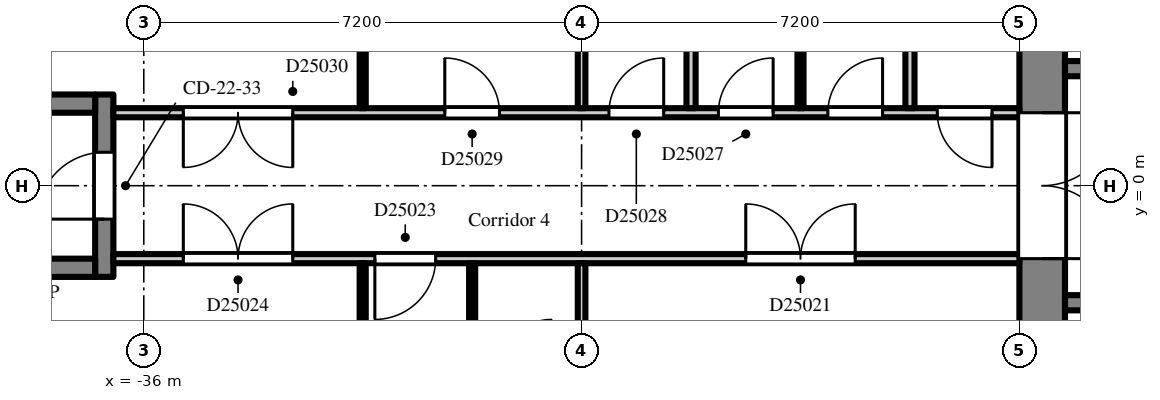
"""IFC4 building model, lengths in metres.
Left out: names, types, materials, properties, quantities, classifications, styles, units other than length and angle.
Written with IfcOpenShell. Run it as: python <this file> out.ifc"""

import sys

from ifc_helpers import new_model, si_unit, direction, frame, frame_2d, origin, place, context, subcontext, project, spatial, rectangle, extrude, element, fill, save


model = new_model("IFC4")
c1 = context("Model", 3, precision=1e-05, world=origin(), true_north=direction((0.0, 1.0)))
c2 = subcontext(c1, "Body", "Model", "MODEL_VIEW")
j1 = project(units=[si_unit("LENGTHUNIT", "METRE"), si_unit("PLANEANGLEUNIT", "RADIAN")], contexts=[c1])
p1 = place(None, origin())
s1 = spatial("IfcSite", under=j1, at=p1, CompositionType="ELEMENT")
p2 = place(p1, origin())
s2 = spatial("IfcBuilding", under=s1, at=p2, CompositionType="ELEMENT")
p3 = place(p2, frame((0.0, 0.0, 170.7)))
s3 = spatial("IfcBuildingStorey", under=s2, at=p3, CompositionType="ELEMENT", Elevation=170.7)
p4 = place(p3, frame((-21.225, -7.2, 0.0), z_axis=(0.0, 0.0, 1.0), x_axis=(0.0, 1.0, 0.0)))
e1 = element("IfcWall", 1, at=p4, inside=s3, PredefinedType="SHEAR", context=c2, shape_type="SweptSolid", body=[
    extrude(rectangle(XDim=14.4, YDim=0.75, at=frame_2d((7.2, 0.0))), origin(), (0.0, 0.0, 1.0), 2.6),
])
p5 = place(p4, frame((6.0, 0.0, 0.0)))
e2 = element("IfcOpeningElement", 2, at=p5, cuts=e1, PredefinedType="OPENING", context=c2, shape_type="SweptSolid", body=[
    extrude(rectangle(XDim=2.4, YDim=2.2, at=frame_2d((1.2, 1.1))), frame((0.0, 0.385, 0.0), z_axis=(0.0, -1.0, 0.0), x_axis=(1.0, 0.0, 0.0)), (0.0, 0.0, 1.0), 0.77),
])
p6 = place(p3, frame((-7.9, 1.925, 0.0), z_axis=(0.0, 0.0, 1.0), x_axis=(-1.0, 0.0, 0.0)))
e3 = element("IfcWall", 3, at=p6, inside=s3, PredefinedType="SHEAR", context=c2, shape_type="SweptSolid", body=[
    extrude(rectangle(XDim=12.95, YDim=0.25, at=frame_2d((6.475, 0.0))), origin(), (0.0, 0.0, 1.0), 2.6),
])
p7 = place(p6, frame((4.825, 0.0, 0.0)))
e4 = element("IfcOpeningElement", 4, at=p7, cuts=e3, PredefinedType="OPENING", context=c2, shape_type="SweptSolid", body=[
    extrude(rectangle(XDim=1.1, YDim=2.1, at=frame_2d((0.55, 1.05))), frame((0.0, 0.135, 0.0), z_axis=(0.0, -1.0, 0.0), x_axis=(1.0, 0.0, 0.0)), (0.0, 0.0, 1.0), 0.27),
])
p8 = place(p6, frame((7.025, 0.0, 0.0)))
e5 = element("IfcOpeningElement", 5, at=p8, cuts=e3, PredefinedType="OPENING", context=c2, shape_type="SweptSolid", body=[
    extrude(rectangle(XDim=1.1, YDim=2.1, at=frame_2d((0.55, 1.05))), frame((0.0, 0.135, 0.0), z_axis=(0.0, -1.0, 0.0), x_axis=(1.0, 0.0, 0.0)), (0.0, 0.0, 1.0), 0.27),
])
p9 = place(p6, frame((9.225, 0.0, 0.0)))
e6 = element("IfcOpeningElement", 6, at=p9, cuts=e3, PredefinedType="OPENING", context=c2, shape_type="SweptSolid", body=[
    extrude(rectangle(XDim=1.1, YDim=2.1, at=frame_2d((0.55, 1.05))), frame((0.0, 0.135, 0.0), z_axis=(0.0, -1.0, 0.0), x_axis=(1.0, 0.0, 0.0)), (0.0, 0.0, 1.0), 0.27),
])
p10 = place(p6, frame((0.525, 0.0, 0.0)))
e7 = element("IfcOpeningElement", 7, at=p10, cuts=e3, PredefinedType="OPENING", context=c2, shape_type="SweptSolid", body=[
    extrude(rectangle(XDim=0.9, YDim=2.1, at=frame_2d((0.45, 1.05))), frame((0.0, 0.135, 0.0), z_axis=(0.0, -1.0, 0.0), x_axis=(1.0, 0.0, 0.0)), (0.0, 0.0, 1.0), 0.27),
])
p11 = place(p6, frame((2.625, 0.0, 0.0)))
e8 = element("IfcOpeningElement", 8, at=p11, cuts=e3, PredefinedType="OPENING", context=c2, shape_type="SweptSolid", body=[
    extrude(rectangle(XDim=1.1, YDim=2.1, at=frame_2d((0.55, 1.05))), frame((0.0, 0.135, 0.0), z_axis=(0.0, -1.0, 0.0), x_axis=(1.0, 0.0, 0.0)), (0.0, 0.0, 1.0), 0.27),
])
p12 = place(p6, frame((11.525, 0.0, 0.0)))
e9 = element("IfcOpeningElement", 9, at=p12, cuts=e3, PredefinedType="OPENING", context=c2, shape_type="SweptSolid", body=[
    extrude(rectangle(XDim=0.9, YDim=2.1, at=frame_2d((0.45, 1.05))), frame((0.0, 0.135, 0.0), z_axis=(0.0, -1.0, 0.0), x_axis=(1.0, 0.0, 0.0)), (0.0, 0.0, 1.0), 0.27),
])
p13 = place(p3, frame((-7.9, -1.925, 0.0), z_axis=(0.0, 0.0, 1.0), x_axis=(-1.0, 0.0, 0.0)))
e10 = element("IfcWall", 10, at=p13, inside=s3, PredefinedType="SHEAR", context=c2, shape_type="SweptSolid", body=[
    extrude(rectangle(XDim=12.95, YDim=0.25, at=frame_2d((6.475, 0.0))), origin(), (0.0, 0.0, 1.0), 2.6),
])
p14 = place(p13, frame((0.525, 0.0, 0.0)))
e11 = element("IfcOpeningElement", 11, at=p14, cuts=e10, PredefinedType="OPENING", context=c2, shape_type="SweptSolid", body=[
    extrude(rectangle(XDim=0.9, YDim=2.1, at=frame_2d((0.45, 1.05))), frame((0.0, 0.135, 0.0), z_axis=(0.0, -1.0, 0.0), x_axis=(1.0, 0.0, 0.0)), (0.0, 0.0, 1.0), 0.27),
])
p15 = place(p13, frame((2.625, 0.0, 0.0)))
e12 = element("IfcOpeningElement", 12, at=p15, cuts=e10, PredefinedType="OPENING", context=c2, shape_type="SweptSolid", body=[
    extrude(rectangle(XDim=1.1, YDim=2.1, at=frame_2d((0.55, 1.05))), frame((0.0, 0.135, 0.0), z_axis=(0.0, -1.0, 0.0), x_axis=(1.0, 0.0, 0.0)), (0.0, 0.0, 1.0), 0.27),
])
p16 = place(p13, frame((6.025, 0.0, 0.0)))
e13 = element("IfcOpeningElement", 13, at=p16, cuts=e10, PredefinedType="OPENING", context=c2, shape_type="SweptSolid", body=[
    extrude(rectangle(XDim=0.9, YDim=2.1, at=frame_2d((0.45, 1.05))), frame((0.0, 0.135, 0.0), z_axis=(0.0, -1.0, 0.0), x_axis=(1.0, 0.0, 0.0)), (0.0, 0.0, 1.0), 0.27),
])
p17 = place(p13, frame((10.425, 0.0, 0.0)))
e14 = element("IfcOpeningElement", 14, at=p17, cuts=e10, PredefinedType="OPENING", context=c2, shape_type="SweptSolid", body=[
    extrude(rectangle(XDim=0.9, YDim=2.1, at=frame_2d((0.45, 1.05))), frame((0.0, 0.135, 0.0), z_axis=(0.0, -1.0, 0.0), x_axis=(1.0, 0.0, 0.0)), (0.0, 0.0, 1.0), 0.27),
])
p18 = place(p3, frame((-36.65, -1.5, 0.0), z_axis=(0.0, 0.0, 1.0), x_axis=(0.0, 1.0, 0.0)))
e15 = element("IfcWall", 15, at=p18, inside=s3, PredefinedType="SHEAR", context=c2, shape_type="SweptSolid", body=[
    extrude(rectangle(XDim=3.0, YDim=0.3, at=frame_2d((1.5, 0.0))), origin(), (0.0, 0.0, 1.0), 2.6),
])
p19 = place(p18, frame((0.95, 0.0, 0.0)))
e16 = element("IfcOpeningElement", 16, at=p19, cuts=e15, PredefinedType="OPENING", context=c2, shape_type="SweptSolid", body=[
    extrude(rectangle(XDim=1.1, YDim=2.1, at=frame_2d((0.55, 1.05))), frame((0.0, 0.16, 0.0), z_axis=(0.0, -1.0, 0.0), x_axis=(1.0, 0.0, 0.0)), (0.0, 0.0, 1.0), 0.32),
])
for number, where, z_axis, x_axis in (
    (17, (-36.8, -1.35, 0.0), (0.0, 0.0, 1.0), (-1.0, 0.0, 0.0)),
    (18, (-36.8, 1.35, 0.0), (0.0, 0.0, 1.0), (-1.0, 0.0, 0.0)),
):
    element("IfcWall", number, at=place(p3, frame(where, z_axis=z_axis, x_axis=x_axis)), inside=s3, PredefinedType="SHEAR", context=c2, shape_type="SweptSolid", body=[
        extrude(rectangle(XDim=5.8, YDim=0.3, at=frame_2d((2.9, 0.0))), origin(), (0.0, 0.0, 1.0), 2.6),
    ])
p20 = place(p3, frame((-36.5, -1.2, 0.0), z_axis=(0.0, 0.0, 1.0), x_axis=(1.0, 0.0, 0.0)))
e19 = element("IfcWall", 19, at=p20, inside=s3, PredefinedType="PARTITIONING", context=c2, shape_type="SweptSolid", body=[
    extrude(rectangle(XDim=14.9, YDim=0.15, at=frame_2d((7.45, 0.0))), origin(), (0.0, 0.0, 1.0), 2.6),
])
p21 = place(p20, frame((10.4, 0.0, 0.0)))
e20 = element("IfcOpeningElement", 20, at=p21, cuts=e19, PredefinedType="OPENING", context=c2, shape_type="SweptSolid", body=[
    extrude(rectangle(XDim=1.8, YDim=2.1, at=frame_2d((0.9, 1.05))), frame((0.0, 0.085, 0.0), z_axis=(0.0, -1.0, 0.0), x_axis=(1.0, 0.0, 0.0)), (0.0, 0.0, 1.0), 0.17),
])
p22 = place(p20, frame((4.3, 0.0, 0.0)))
e21 = element("IfcOpeningElement", 21, at=p22, cuts=e19, PredefinedType="OPENING", context=c2, shape_type="SweptSolid", body=[
    extrude(rectangle(XDim=1.0, YDim=2.1, at=frame_2d((0.5, 1.05))), frame((0.0, 0.085, 0.0), z_axis=(0.0, -1.0, 0.0), x_axis=(1.0, 0.0, 0.0)), (0.0, 0.0, 1.0), 0.17),
])
p23 = place(p20, frame((1.15, 0.0, 0.0)))
e22 = element("IfcOpeningElement", 22, at=p23, cuts=e19, PredefinedType="OPENING", context=c2, shape_type="SweptSolid", body=[
    extrude(rectangle(XDim=1.8, YDim=2.1, at=frame_2d((0.9, 1.05))), frame((0.0, 0.085, 0.0), z_axis=(0.0, -1.0, 0.0), x_axis=(1.0, 0.0, 0.0)), (0.0, 0.0, 1.0), 0.17),
])
p24 = place(p3, frame((-36.5, 1.2, 0.0), z_axis=(0.0, 0.0, 1.0), x_axis=(1.0, 0.0, 0.0)))
e23 = element("IfcWall", 23, at=p24, inside=s3, PredefinedType="PARTITIONING", context=c2, shape_type="SweptSolid", body=[
    extrude(rectangle(XDim=14.9, YDim=0.15, at=frame_2d((7.45, 0.0))), origin(), (0.0, 0.0, 1.0), 2.6),
])
p25 = place(p24, frame((13.55, 0.0, 0.0)))
e24 = element("IfcOpeningElement", 24, at=p25, cuts=e23, PredefinedType="OPENING", context=c2, shape_type="SweptSolid", body=[
    extrude(rectangle(XDim=0.9, YDim=2.1, at=frame_2d((0.45, 1.05))), frame((0.0, 0.085, 0.0), z_axis=(0.0, -1.0, 0.0), x_axis=(1.0, 0.0, 0.0)), (0.0, 0.0, 1.0), 0.17),
])
p26 = place(p24, frame((11.75, 0.0, 0.0)))
e25 = element("IfcOpeningElement", 25, at=p26, cuts=e23, PredefinedType="OPENING", context=c2, shape_type="SweptSolid", body=[
    extrude(rectangle(XDim=0.9, YDim=2.1, at=frame_2d((0.45, 1.05))), frame((0.0, 0.085, 0.0), z_axis=(0.0, -1.0, 0.0), x_axis=(1.0, 0.0, 0.0)), (0.0, 0.0, 1.0), 0.17),
])
p27 = place(p24, frame((9.95, 0.0, 0.0)))
e26 = element("IfcOpeningElement", 26, at=p27, cuts=e23, PredefinedType="OPENING", context=c2, shape_type="SweptSolid", body=[
    extrude(rectangle(XDim=0.9, YDim=2.1, at=frame_2d((0.45, 1.05))), frame((0.0, 0.085, 0.0), z_axis=(0.0, -1.0, 0.0), x_axis=(1.0, 0.0, 0.0)), (0.0, 0.0, 1.0), 0.17),
])
p28 = place(p24, frame((8.15, 0.0, 0.0)))
e27 = element("IfcOpeningElement", 27, at=p28, cuts=e23, PredefinedType="OPENING", context=c2, shape_type="SweptSolid", body=[
    extrude(rectangle(XDim=0.9, YDim=2.1, at=frame_2d((0.45, 1.05))), frame((0.0, 0.085, 0.0), z_axis=(0.0, -1.0, 0.0), x_axis=(1.0, 0.0, 0.0)), (0.0, 0.0, 1.0), 0.17),
])
p29 = place(p24, frame((5.45, 0.0, 0.0)))
e28 = element("IfcOpeningElement", 28, at=p29, cuts=e23, PredefinedType="OPENING", context=c2, shape_type="SweptSolid", body=[
    extrude(rectangle(XDim=0.9, YDim=2.1, at=frame_2d((0.45, 1.05))), frame((0.0, 0.085, 0.0), z_axis=(0.0, -1.0, 0.0), x_axis=(1.0, 0.0, 0.0)), (0.0, 0.0, 1.0), 0.17),
])
p30 = place(p24, frame((1.15, 0.0, 0.0)))
e29 = element("IfcOpeningElement", 29, at=p30, cuts=e23, PredefinedType="OPENING", context=c2, shape_type="SweptSolid", body=[
    extrude(rectangle(XDim=1.8, YDim=2.1, at=frame_2d((0.9, 1.05))), frame((0.0, 0.085, 0.0), z_axis=(0.0, -1.0, 0.0), x_axis=(1.0, 0.0, 0.0)), (0.0, 0.0, 1.0), 0.17),
])
for number, where, z_axis, x_axis in (
    (30, (-32.4, -6.9, 0.0), (0.0, 0.0, 1.0), (0.0, 1.0, 0.0)),
    (31, (-32.4, 1.275, 0.0), (0.0, 0.0, 1.0), (0.0, 1.0, 0.0)),
):
    element("IfcWall", number, at=place(p3, frame(where, z_axis=z_axis, x_axis=x_axis)), inside=s3, PredefinedType="PARTITIONING", context=c2, shape_type="SweptSolid", body=[
        extrude(rectangle(XDim=5.625, YDim=0.1, at=frame_2d((2.812, 0.0))), origin(), (0.0, 0.0, 1.0), 2.6),
    ])
p31 = place(p3, frame((-30.6, -3.05, 0.0), z_axis=(0.0, 0.0, 1.0), x_axis=(0.0, 1.0, 0.0)))
e32 = element("IfcWall", 32, at=p31, inside=s3, PredefinedType="PARTITIONING", context=c2, shape_type="SweptSolid", body=[
    extrude(rectangle(XDim=1.775, YDim=0.1, at=frame_2d((0.888, 0.0))), origin(), (0.0, 0.0, 1.0), 2.6),
])
p32 = place(p3, frame((-28.8, -3.0, 0.0), z_axis=(0.0, 0.0, 1.0), x_axis=(0.0, 1.0, 0.0)))
e33 = element("IfcWall", 33, at=p32, inside=s3, PredefinedType="PARTITIONING", context=c2, shape_type="SweptSolid", body=[
    extrude(rectangle(XDim=1.725, YDim=0.125, at=frame_2d((0.863, 0.0))), origin(), (0.0, 0.0, 1.0), 2.6),
])
p33 = place(p3, frame((-28.8, 1.275, 0.0), z_axis=(0.0, 0.0, 1.0), x_axis=(0.0, 1.0, 0.0)))
e34 = element("IfcWall", 34, at=p33, inside=s3, PredefinedType="PARTITIONING", context=c2, shape_type="SweptSolid", body=[
    extrude(rectangle(XDim=5.625, YDim=0.125, at=frame_2d((2.812, 0.0))), origin(), (0.0, 0.0, 1.0), 2.6),
])
p34 = place(p3, frame((-27.0, 1.275, 0.0), z_axis=(0.0, 0.0, 1.0), x_axis=(0.0, 1.0, 0.0)))
e35 = element("IfcWall", 35, at=p34, inside=s3, PredefinedType="PARTITIONING", context=c2, shape_type="SweptSolid", body=[
    extrude(rectangle(XDim=5.625, YDim=0.15, at=frame_2d((2.812, 0.0))), origin(), (0.0, 0.0, 1.0), 2.6),
])
p35 = place(p3, frame((-25.2, 1.275, 0.0), z_axis=(0.0, 0.0, 1.0), x_axis=(0.0, 1.0, 0.0)))
e36 = element("IfcWall", 36, at=p35, inside=s3, PredefinedType="PARTITIONING", context=c2, shape_type="SweptSolid", body=[
    extrude(rectangle(XDim=5.625, YDim=0.1, at=frame_2d((2.812, 0.0))), origin(), (0.0, 0.0, 1.0), 2.6),
])
p36 = place(p3, frame((-23.4, 1.275, 0.0), z_axis=(0.0, 0.0, 1.0), x_axis=(0.0, 1.0, 0.0)))
e37 = element("IfcWall", 37, at=p36, inside=s3, PredefinedType="PARTITIONING", context=c2, shape_type="SweptSolid", body=[
    extrude(rectangle(XDim=5.625, YDim=0.15, at=frame_2d((2.812, 0.0))), origin(), (0.0, 0.0, 1.0), 2.6),
])
p37 = place(p5, frame((2.4, 0.0, 0.0), z_axis=(0.0, 0.0, 1.0), x_axis=(-1.0, 0.0, 0.0)))
e38 = element("IfcDoor", 38, at=p37, inside=s3, OperationType="DOUBLE_DOOR_DOUBLE_SWING", PredefinedType="DOOR", context=c2, shape_type="SweptSolid", body=[
    extrude(rectangle(XDim=2.4, YDim=2.2, at=frame_2d((1.2, 1.1))), frame((0.0, 0.025, 0.0), z_axis=(0.0, -1.0, 0.0), x_axis=(1.0, 0.0, 0.0)), (0.0, 0.0, 1.0), 0.05),
])
fill(e2, e38)
p38 = place(p19, origin())
e39 = element("IfcDoor", 39, at=p38, inside=s3, OperationType="SINGLE_SWING_LEFT", PredefinedType="DOOR", context=c2, shape_type="SweptSolid", body=[
    extrude(rectangle(XDim=1.1, YDim=2.1, at=frame_2d((0.55, 1.05))), frame((0.0, 0.025, 0.0), z_axis=(0.0, -1.0, 0.0), x_axis=(1.0, 0.0, 0.0)), (0.0, 0.0, 1.0), 0.05),
])
fill(e16, e39)
p39 = place(p21, origin())
e40 = element("IfcDoor", 40, at=p39, inside=s3, OperationType="DOUBLE_DOOR_DOUBLE_SWING", PredefinedType="DOOR", context=c2, shape_type="SweptSolid", body=[
    extrude(rectangle(XDim=1.8, YDim=2.1, at=frame_2d((0.9, 1.05))), frame((0.0, 0.025, 0.0), z_axis=(0.0, -1.0, 0.0), x_axis=(1.0, 0.0, 0.0)), (0.0, 0.0, 1.0), 0.05),
])
fill(e20, e40)
p40 = place(p22, frame((1.0, 0.0, 0.0), z_axis=(0.0, 0.0, 1.0), x_axis=(-1.0, 0.0, 0.0)))
e41 = element("IfcDoor", 41, at=p40, inside=s3, OperationType="SINGLE_SWING_RIGHT", PredefinedType="DOOR", context=c2, shape_type="SweptSolid", body=[
    extrude(rectangle(XDim=1.0, YDim=2.1, at=frame_2d((0.5, 1.05))), frame((0.0, 0.025, 0.0), z_axis=(0.0, -1.0, 0.0), x_axis=(1.0, 0.0, 0.0)), (0.0, 0.0, 1.0), 0.05),
])
fill(e21, e41)
p41 = place(p23, origin())
e42 = element("IfcDoor", 42, at=p41, inside=s3, OperationType="DOUBLE_DOOR_DOUBLE_SWING", PredefinedType="DOOR", context=c2, shape_type="SweptSolid", body=[
    extrude(rectangle(XDim=1.8, YDim=2.1, at=frame_2d((0.9, 1.05))), frame((0.0, 0.025, 0.0), z_axis=(0.0, -1.0, 0.0), x_axis=(1.0, 0.0, 0.0)), (0.0, 0.0, 1.0), 0.05),
])
fill(e22, e42)
p42 = place(p25, frame((0.9, 0.0, 0.0), z_axis=(0.0, 0.0, 1.0), x_axis=(-1.0, 0.0, 0.0)))
e43 = element("IfcDoor", 43, at=p42, inside=s3, OperationType="SINGLE_SWING_LEFT", PredefinedType="DOOR", context=c2, shape_type="SweptSolid", body=[
    extrude(rectangle(XDim=0.9, YDim=2.1, at=frame_2d((0.45, 1.05))), frame((0.0, 0.025, 0.0), z_axis=(0.0, -1.0, 0.0), x_axis=(1.0, 0.0, 0.0)), (0.0, 0.0, 1.0), 0.05),
])
fill(e24, e43)
p43 = place(p26, origin())
e44 = element("IfcDoor", 44, at=p43, inside=s3, OperationType="SINGLE_SWING_RIGHT", PredefinedType="DOOR", context=c2, shape_type="SweptSolid", body=[
    extrude(rectangle(XDim=0.9, YDim=2.1, at=frame_2d((0.45, 1.05))), frame((0.0, 0.025, 0.0), z_axis=(0.0, -1.0, 0.0), x_axis=(1.0, 0.0, 0.0)), (0.0, 0.0, 1.0), 0.05),
])
fill(e25, e44)
p44 = place(p27, origin())
e45 = element("IfcDoor", 45, at=p44, inside=s3, OperationType="SINGLE_SWING_RIGHT", PredefinedType="DOOR", context=c2, shape_type="SweptSolid", body=[
    extrude(rectangle(XDim=0.9, YDim=2.1, at=frame_2d((0.45, 1.05))), frame((0.0, 0.025, 0.0), z_axis=(0.0, -1.0, 0.0), x_axis=(1.0, 0.0, 0.0)), (0.0, 0.0, 1.0), 0.05),
])
fill(e26, e45)
p45 = place(p28, origin())
e46 = element("IfcDoor", 46, at=p45, inside=s3, OperationType="SINGLE_SWING_RIGHT", PredefinedType="DOOR", context=c2, shape_type="SweptSolid", body=[
    extrude(rectangle(XDim=0.9, YDim=2.1, at=frame_2d((0.45, 1.05))), frame((0.0, 0.025, 0.0), z_axis=(0.0, -1.0, 0.0), x_axis=(1.0, 0.0, 0.0)), (0.0, 0.0, 1.0), 0.05),
])
fill(e27, e46)
p46 = place(p29, origin())
e47 = element("IfcDoor", 47, at=p46, inside=s3, OperationType="SINGLE_SWING_LEFT", PredefinedType="DOOR", context=c2, shape_type="SweptSolid", body=[
    extrude(rectangle(XDim=0.9, YDim=2.1, at=frame_2d((0.45, 1.05))), frame((0.0, 0.025, 0.0), z_axis=(0.0, -1.0, 0.0), x_axis=(1.0, 0.0, 0.0)), (0.0, 0.0, 1.0), 0.05),
])
fill(e28, e47)
p47 = place(p30, frame((1.8, 0.0, 0.0), z_axis=(0.0, 0.0, 1.0), x_axis=(-1.0, 0.0, 0.0)))
e48 = element("IfcDoor", 48, at=p47, inside=s3, OperationType="DOUBLE_DOOR_DOUBLE_SWING", PredefinedType="DOOR", context=c2, shape_type="SweptSolid", body=[
    extrude(rectangle(XDim=1.8, YDim=2.1, at=frame_2d((0.9, 1.05))), frame((0.0, 0.025, 0.0), z_axis=(0.0, -1.0, 0.0), x_axis=(1.0, 0.0, 0.0)), (0.0, 0.0, 1.0), 0.05),
])
fill(e29, e48)
save(model, sys.argv[1])
